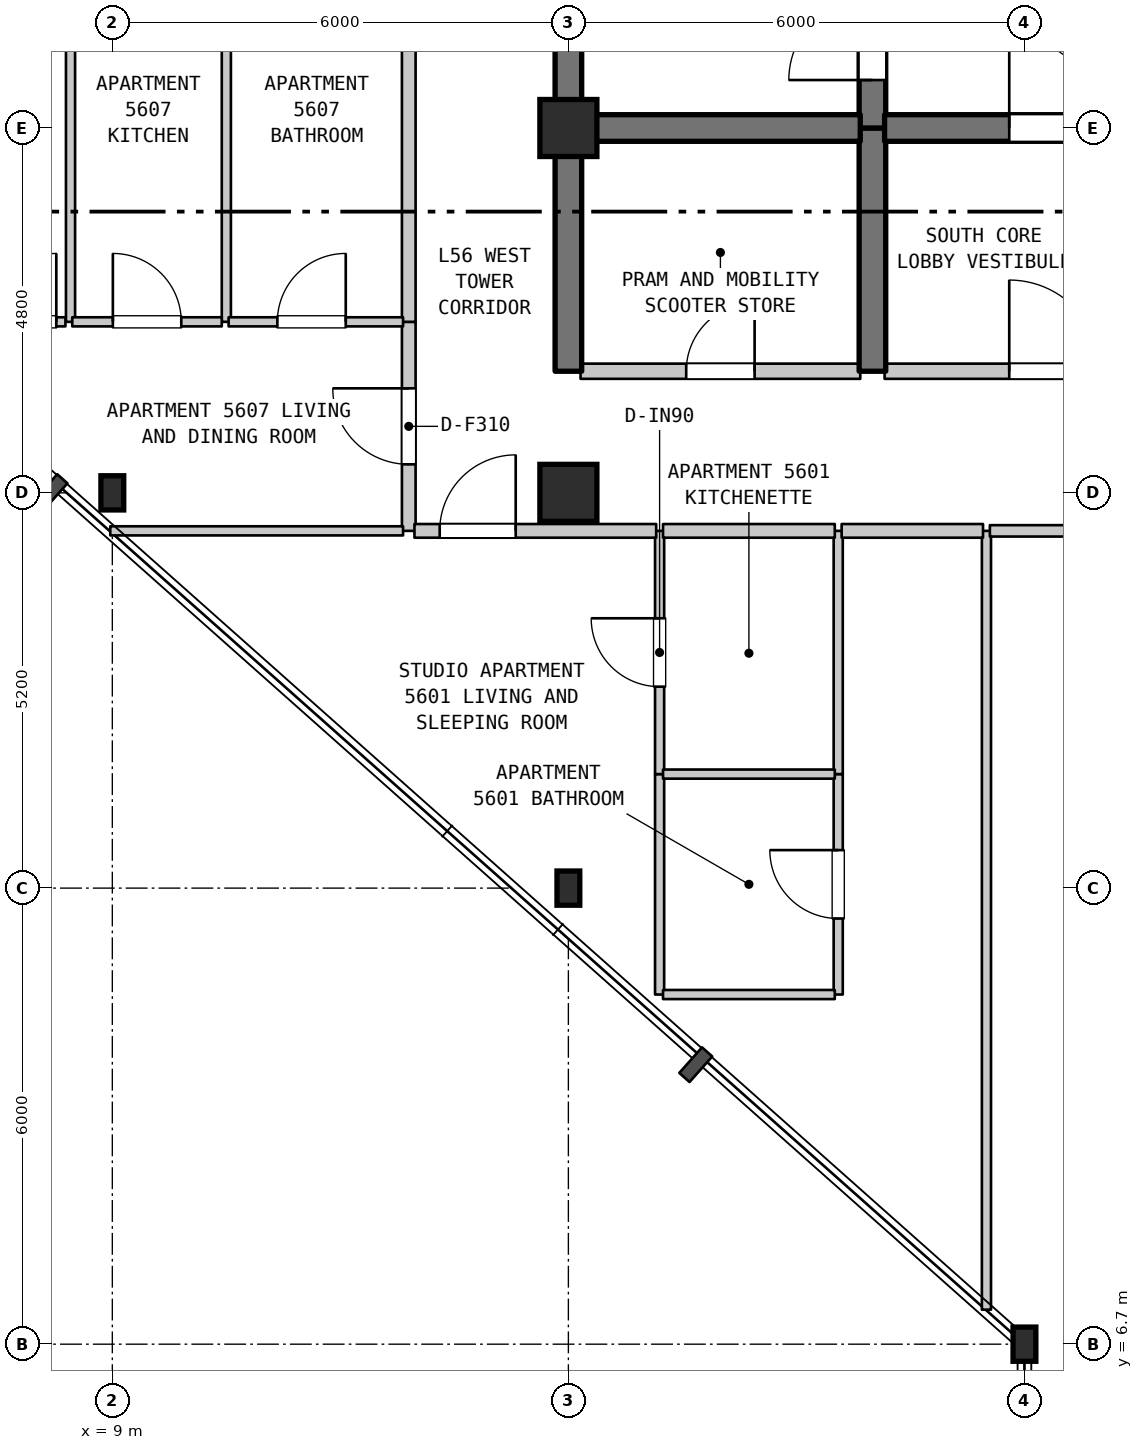
"""IFC4 building model, lengths in metres.
Left out: names, types, materials, properties, quantities, classifications, styles, units other than length and angle.
Written with IfcOpenShell. Run it as: python <this file> out.ifc"""

import sys

from ifc_helpers import new_model, si_unit, direction, frame, frame_2d, origin, origin_2d, place, context, subcontext, project, spatial, rectangle, i_section, extrude, element, fill, save


model = new_model("IFC4")
c1 = context("Model", 3, precision=1e-05, world=origin(), true_north=direction((0.0, 1.0)))
c2 = subcontext(c1, "Body", "Model", "MODEL_VIEW")
j1 = project(units=[si_unit("LENGTHUNIT", "METRE"), si_unit("PLANEANGLEUNIT", "RADIAN")], contexts=[c1])
p1 = place(None, origin())
s1 = spatial("IfcSite", under=j1, at=p1, CompositionType="ELEMENT")
p2 = place(p1, origin())
s2 = spatial("IfcBuilding", under=s1, at=p2, CompositionType="ELEMENT")
p3 = place(p2, frame((0.0, 0.0, 226.5)))
s3 = spatial("IfcBuildingStorey", under=s2, at=p3, CompositionType="ELEMENT", Elevation=226.5)
for number, where, z_axis, x_axis in (
    (1, (9.0, 17.9, 0.0), (0.0, 0.0, 1.0), (1.0, 0.0, 0.0)),
    (2, (15.0, 12.7, 0.0), (0.0, 0.0, 1.0), (1.0, 0.0, 0.0)),
):
    element("IfcColumn", number, at=place(p3, frame(where, z_axis=z_axis, x_axis=x_axis)), inside=s3, PredefinedType="COLUMN", context=c2, shape_type="SweptSolid", body=[
        extrude(i_section(OverallWidth=0.3, OverallDepth=0.45, WebThickness=0.014, FlangeThickness=0.026, FilletRadius=0.027, at=origin_2d()), origin(), (0.0, 0.0, 1.0), 3.7),
    ])
for number, where, z_axis, x_axis in (
    (3, (15.0, 17.9, 0.0), (0.0, 0.0, 1.0), (1.0, 0.0, 0.0)),
    (4, (15.0, 22.7, 0.0), (0.0, 0.0, 1.0), (1.0, 0.0, 0.0)),
):
    element("IfcColumn", number, at=place(p3, frame(where, z_axis=z_axis, x_axis=x_axis)), inside=s3, PredefinedType="COLUMN", context=c2, shape_type="SweptSolid", body=[
        extrude(rectangle(XDim=0.75, YDim=0.75, at=origin_2d()), origin(), (0.0, 0.0, 1.0), 3.7),
    ])
p4 = place(p3, frame((21.0, 6.7, 0.0), z_axis=(0.0, 0.0, 1.0), x_axis=(1.0, 0.0, 0.0)))
e5 = element("IfcColumn", 5, at=p4, inside=s3, PredefinedType="COLUMN", context=c2, shape_type="SweptSolid", body=[
    extrude(i_section(OverallWidth=0.3, OverallDepth=0.45, WebThickness=0.014, FlangeThickness=0.026, FilletRadius=0.027, at=origin_2d()), origin(), (0.0, 0.0, 1.0), 3.7),
])
for number, where, z_axis, x_axis in (
    (6, (8.45, 20.15, 0.0), (0.0, 0.0, 1.0), (0.0, 1.0, 0.0)),
    (7, (10.5, 20.15, 0.0), (0.0, 0.0, 1.0), (0.0, 1.0, 0.0)),
):
    element("IfcWall", number, at=place(p3, frame(where, z_axis=z_axis, x_axis=x_axis)), inside=s3, PredefinedType="PARTITIONING", context=c2, shape_type="SweptSolid", body=[
        extrude(rectangle(XDim=4.97, YDim=0.12, at=frame_2d((2.485, 0.0))), origin(), (0.0, 0.0, 1.0), 3.39),
    ])
p5 = place(p3, frame((12.9, 17.4, 0.0), z_axis=(0.0, 0.0, 1.0), x_axis=(0.0, 1.0, 0.0)))
e8 = element("IfcWall", 8, at=p5, inside=s3, PredefinedType="STANDARD", context=c2, shape_type="SweptSolid", body=[
    extrude(rectangle(XDim=2.75, YDim=0.18, at=frame_2d((1.375, 0.0))), origin(), (0.0, 0.0, 1.0), 3.39),
])
p6 = place(p5, frame((0.875, 0.0, 0.0)))
e9 = element("IfcOpeningElement", 9, at=p6, cuts=e8, PredefinedType="OPENING", context=c2, shape_type="SweptSolid", body=[
    extrude(rectangle(XDim=1.0, YDim=2.15, at=frame_2d((0.5, 1.075))), frame((0.0, 0.1, 0.0), z_axis=(0.0, -1.0, 0.0), x_axis=(1.0, 0.0, 0.0)), (0.0, 0.0, 1.0), 0.2),
])
p7 = place(p3, frame((12.9, 20.15, 0.0), z_axis=(0.0, 0.0, 1.0), x_axis=(0.0, 1.0, 0.0)))
e10 = element("IfcWall", 10, at=p7, inside=s3, PredefinedType="STANDARD", context=c2, shape_type="SweptSolid", body=[
    extrude(rectangle(XDim=4.97, YDim=0.18, at=frame_2d((2.485, 0.0))), origin(), (0.0, 0.0, 1.0), 3.39),
])
p8 = place(p3, frame((15.0, 19.5, 0.0), z_axis=(0.0, 0.0, 1.0), x_axis=(0.0, 1.0, 0.0)))
e11 = element("IfcWall", 11, at=p8, inside=s3, PredefinedType="SHEAR", context=c2, shape_type="SweptSolid", body=[
    extrude(rectangle(XDim=3.2, YDim=0.35, at=frame_2d((1.6, 0.0))), origin(), (0.0, 0.0, 1.0), 3.39),
])
p9 = place(p3, frame((15.0, 22.7, 0.0), z_axis=(0.0, 0.0, 1.0), x_axis=(0.0, 1.0, 0.0)))
e12 = element("IfcWall", 12, at=p9, inside=s3, PredefinedType="SHEAR", context=c2, shape_type="SweptSolid", body=[
    extrude(rectangle(XDim=6.8, YDim=0.35, at=frame_2d((3.4, 0.0))), origin(), (0.0, 0.0, 1.0), 3.39),
])
p10 = place(p3, frame((16.2, 11.3, 0.0), z_axis=(0.0, 0.0, 1.0), x_axis=(0.0, 1.0, 0.0)))
e13 = element("IfcWall", 13, at=p10, inside=s3, PredefinedType="PARTITIONING", context=c2, shape_type="SweptSolid", body=[
    extrude(rectangle(XDim=2.9, YDim=0.12, at=frame_2d((1.45, 0.0))), origin(), (0.0, 0.0, 1.0), 3.39),
])
p11 = place(p3, frame((16.2, 14.2, 0.0), z_axis=(0.0, 0.0, 1.0), x_axis=(0.0, 1.0, 0.0)))
e14 = element("IfcWall", 14, at=p11, inside=s3, PredefinedType="PARTITIONING", context=c2, shape_type="SweptSolid", body=[
    extrude(rectangle(XDim=3.2, YDim=0.12, at=frame_2d((1.6, 0.0))), origin(), (0.0, 0.0, 1.0), 3.39),
])
p12 = place(p11, frame((1.15, 0.0, 0.0)))
e15 = element("IfcOpeningElement", 15, at=p12, cuts=e14, PredefinedType="OPENING", context=c2, shape_type="SweptSolid", body=[
    extrude(rectangle(XDim=0.9, YDim=2.15, at=frame_2d((0.45, 1.075))), frame((0.0, 0.07, 0.0), z_axis=(0.0, -1.0, 0.0), x_axis=(1.0, 0.0, 0.0)), (0.0, 0.0, 1.0), 0.14),
])
p13 = place(p3, frame((18.55, 11.3, 0.0), z_axis=(0.0, 0.0, 1.0), x_axis=(0.0, 1.0, 0.0)))
e16 = element("IfcWall", 16, at=p13, inside=s3, PredefinedType="PARTITIONING", context=c2, shape_type="SweptSolid", body=[
    extrude(rectangle(XDim=2.9, YDim=0.12, at=frame_2d((1.45, 0.0))), origin(), (0.0, 0.0, 1.0), 3.39),
])
p14 = place(p13, frame((1.0, 0.0, 0.0)))
e17 = element("IfcOpeningElement", 17, at=p14, cuts=e16, PredefinedType="OPENING", context=c2, shape_type="SweptSolid", body=[
    extrude(rectangle(XDim=0.9, YDim=2.1, at=frame_2d((0.45, 1.05))), frame((0.0, 0.07, 0.0), z_axis=(0.0, -1.0, 0.0), x_axis=(1.0, 0.0, 0.0)), (0.0, 0.0, 1.0), 0.14),
])
p15 = place(p3, frame((18.55, 14.2, 0.0), z_axis=(0.0, 0.0, 1.0), x_axis=(0.0, 1.0, 0.0)))
e18 = element("IfcWall", 18, at=p15, inside=s3, PredefinedType="PARTITIONING", context=c2, shape_type="SweptSolid", body=[
    extrude(rectangle(XDim=3.2, YDim=0.12, at=frame_2d((1.6, 0.0))), origin(), (0.0, 0.0, 1.0), 3.39),
])
p16 = place(p3, frame((19.0, 19.5, 0.0), z_axis=(0.0, 0.0, 1.0), x_axis=(0.0, 1.0, 0.0)))
e19 = element("IfcWall", 19, at=p16, inside=s3, PredefinedType="SHEAR", context=c2, shape_type="SweptSolid", body=[
    extrude(rectangle(XDim=3.2, YDim=0.35, at=frame_2d((1.6, 0.0))), origin(), (0.0, 0.0, 1.0), 3.39),
])
p17 = place(p3, frame((19.0, 22.7, 0.0), z_axis=(0.0, 0.0, 1.0), x_axis=(0.0, 1.0, 0.0)))
e20 = element("IfcWall", 20, at=p17, inside=s3, PredefinedType="SHEAR", context=c2, shape_type="SweptSolid", body=[
    extrude(rectangle(XDim=5.5, YDim=0.35, at=frame_2d((2.75, 0.0))), origin(), (0.0, 0.0, 1.0), 3.39),
])
p18 = place(p17, frame((0.631, 0.0, 0.0)))
e21 = element("IfcOpeningElement", 21, at=p18, cuts=e20, PredefinedType="OPENING", context=c2, shape_type="SweptSolid", body=[
    extrude(rectangle(XDim=1.1, YDim=2.15, at=frame_2d((0.55, 1.075))), frame((0.0, 0.185, 0.0), z_axis=(0.0, -1.0, 0.0), x_axis=(1.0, 0.0, 0.0)), (0.0, 0.0, 1.0), 0.37),
])
p19 = place(p3, frame((20.5, 7.154, 0.0), z_axis=(0.0, 0.0, 1.0), x_axis=(0.0, 1.0, 0.0)))
e22 = element("IfcWall", 22, at=p19, inside=s3, PredefinedType="PARTITIONING", context=c2, shape_type="SweptSolid", body=[
    extrude(rectangle(XDim=10.246, YDim=0.12, at=frame_2d((5.123, 0.0))), origin(), (0.0, 0.0, 1.0), 3.39),
])
for number, where, z_axis, x_axis in (
    (23, (16.245, 11.3, 0.0), (0.0, 0.0, 1.0), (1.0, 0.0, 0.0)),
    (24, (16.245, 14.2, 0.0), (0.0, 0.0, 1.0), (1.0, 0.0, 0.0)),
):
    element("IfcWall", number, at=place(p3, frame(where, z_axis=z_axis, x_axis=x_axis)), inside=s3, PredefinedType="PARTITIONING", context=c2, shape_type="SweptSolid", body=[
        extrude(rectangle(XDim=2.26, YDim=0.12, at=frame_2d((1.13, 0.0))), origin(), (0.0, 0.0, 1.0), 3.39),
    ])
p20 = place(p3, frame((8.973, 17.4, 0.0), z_axis=(0.0, 0.0, 1.0), x_axis=(1.0, 0.0, 0.0)))
e25 = element("IfcWall", 25, at=p20, inside=s3, PredefinedType="PARTITIONING", context=c2, shape_type="SweptSolid", body=[
    extrude(rectangle(XDim=3.852, YDim=0.12, at=frame_2d((1.926, 0.0))), origin(), (0.0, 0.0, 1.0), 3.39),
])
p21 = place(p3, frame((12.975, 17.4, 0.0), z_axis=(0.0, 0.0, 1.0), x_axis=(1.0, 0.0, 0.0)))
e26 = element("IfcWall", 26, at=p21, inside=s3, PredefinedType="STANDARD", context=c2, shape_type="SweptSolid", body=[
    extrude(rectangle(XDim=3.18, YDim=0.18, at=frame_2d((1.59, 0.0))), origin(), (0.0, 0.0, 1.0), 3.39),
])
p22 = place(p21, frame((0.332, 0.0, 0.0)))
e27 = element("IfcOpeningElement", 27, at=p22, cuts=e26, PredefinedType="OPENING", context=c2, shape_type="SweptSolid", body=[
    extrude(rectangle(XDim=1.0, YDim=2.15, at=frame_2d((0.5, 1.075))), frame((0.0, 0.1, 0.0), z_axis=(0.0, -1.0, 0.0), x_axis=(1.0, 0.0, 0.0)), (0.0, 0.0, 1.0), 0.2),
])
p23 = place(p3, frame((16.245, 17.4, 0.0), z_axis=(0.0, 0.0, 1.0), x_axis=(1.0, 0.0, 0.0)))
e28 = element("IfcWall", 28, at=p23, inside=s3, PredefinedType="STANDARD", context=c2, shape_type="SweptSolid", body=[
    extrude(rectangle(XDim=2.26, YDim=0.18, at=frame_2d((1.13, 0.0))), origin(), (0.0, 0.0, 1.0), 3.39),
])
p24 = place(p3, frame((18.595, 17.4, 0.0), z_axis=(0.0, 0.0, 1.0), x_axis=(1.0, 0.0, 0.0)))
e29 = element("IfcWall", 29, at=p24, inside=s3, PredefinedType="STANDARD", context=c2, shape_type="SweptSolid", body=[
    extrude(rectangle(XDim=1.86, YDim=0.18, at=frame_2d((0.93, 0.0))), origin(), (0.0, 0.0, 1.0), 3.39),
])
p25 = place(p3, frame((20.545, 17.4, 0.0), z_axis=(0.0, 0.0, 1.0), x_axis=(1.0, 0.0, 0.0)))
e30 = element("IfcWall", 30, at=p25, inside=s3, PredefinedType="STANDARD", context=c2, shape_type="SweptSolid", body=[
    extrude(rectangle(XDim=4.91, YDim=0.15, at=frame_2d((2.455, 0.0))), origin(), (0.0, 0.0, 1.0), 3.39),
])
p26 = place(p25, frame((1.884, 0.0, 0.0)))
e31 = element("IfcOpeningElement", 31, at=p26, cuts=e30, PredefinedType="OPENING", context=c2, shape_type="SweptSolid", body=[
    extrude(rectangle(XDim=1.0, YDim=2.15, at=frame_2d((0.5, 1.075))), frame((0.0, 0.085, 0.0), z_axis=(0.0, -1.0, 0.0), x_axis=(1.0, 0.0, 0.0)), (0.0, 0.0, 1.0), 0.17),
])
p27 = place(p3, frame((15.16, 19.5, 0.0), z_axis=(0.0, 0.0, 1.0), x_axis=(1.0, 0.0, 0.0)))
e32 = element("IfcWall", 32, at=p27, inside=s3, PredefinedType="STANDARD", context=c2, shape_type="SweptSolid", body=[
    extrude(rectangle(XDim=3.68, YDim=0.2, at=frame_2d((1.84, 0.0))), origin(), (0.0, 0.0, 1.0), 3.39),
])
p28 = place(p27, frame((1.39, 0.0, 0.0)))
e33 = element("IfcOpeningElement", 33, at=p28, cuts=e32, PredefinedType="OPENING", context=c2, shape_type="SweptSolid", body=[
    extrude(rectangle(XDim=0.9, YDim=2.15, at=frame_2d((0.45, 1.075))), frame((0.0, 0.11, 0.0), z_axis=(0.0, -1.0, 0.0), x_axis=(1.0, 0.0, 0.0)), (0.0, 0.0, 1.0), 0.22),
])
p29 = place(p3, frame((19.16, 19.5, 0.0), z_axis=(0.0, 0.0, 1.0), x_axis=(1.0, 0.0, 0.0)))
e34 = element("IfcWall", 34, at=p29, inside=s3, PredefinedType="STANDARD", context=c2, shape_type="SweptSolid", body=[
    extrude(rectangle(XDim=4.48, YDim=0.2, at=frame_2d((2.24, 0.0))), origin(), (0.0, 0.0, 1.0), 3.39),
])
p30 = place(p29, frame((1.64, 0.0, 0.0)))
e35 = element("IfcOpeningElement", 35, at=p30, cuts=e34, PredefinedType="OPENING", context=c2, shape_type="SweptSolid", body=[
    extrude(rectangle(XDim=1.2, YDim=2.2, at=frame_2d((0.6, 1.1))), frame((0.0, 0.11, 0.0), z_axis=(0.0, -1.0, 0.0), x_axis=(1.0, 0.0, 0.0)), (0.0, 0.0, 1.0), 0.22),
])
p31 = place(p3, frame((5.879, 20.15, 0.0), z_axis=(0.0, 0.0, 1.0), x_axis=(1.0, 0.0, 0.0)))
e36 = element("IfcWall", 36, at=p31, inside=s3, PredefinedType="PARTITIONING", context=c2, shape_type="SweptSolid", body=[
    extrude(rectangle(XDim=2.504, YDim=0.12, at=frame_2d((1.252, 0.0))), origin(), (0.0, 0.0, 1.0), 3.39),
])
p32 = place(p31, frame((1.484, 0.0, 0.0)))
e37 = element("IfcOpeningElement", 37, at=p32, cuts=e36, PredefinedType="OPENING", context=c2, shape_type="SweptSolid", body=[
    extrude(rectangle(XDim=0.9, YDim=2.15, at=frame_2d((0.45, 1.075))), frame((0.0, 0.07, 0.0), z_axis=(0.0, -1.0, 0.0), x_axis=(1.0, 0.0, 0.0)), (0.0, 0.0, 1.0), 0.14),
])
p33 = place(p3, frame((8.473, 20.15, 0.0), z_axis=(0.0, 0.0, 1.0), x_axis=(1.0, 0.0, 0.0)))
e38 = element("IfcWall", 38, at=p33, inside=s3, PredefinedType="PARTITIONING", context=c2, shape_type="SweptSolid", body=[
    extrude(rectangle(XDim=1.967, YDim=0.12, at=frame_2d((0.983, 0.0))), origin(), (0.0, 0.0, 1.0), 3.39),
])
p34 = place(p33, frame((0.534, 0.0, 0.0)))
e39 = element("IfcOpeningElement", 39, at=p34, cuts=e38, PredefinedType="OPENING", context=c2, shape_type="SweptSolid", body=[
    extrude(rectangle(XDim=0.9, YDim=2.15, at=frame_2d((0.45, 1.075))), frame((0.0, 0.07, 0.0), z_axis=(0.0, -1.0, 0.0), x_axis=(1.0, 0.0, 0.0)), (0.0, 0.0, 1.0), 0.14),
])
p35 = place(p3, frame((10.53, 20.15, 0.0), z_axis=(0.0, 0.0, 1.0), x_axis=(1.0, 0.0, 0.0)))
e40 = element("IfcWall", 40, at=p35, inside=s3, PredefinedType="PARTITIONING", context=c2, shape_type="SweptSolid", body=[
    extrude(rectangle(XDim=2.295, YDim=0.12, at=frame_2d((1.147, 0.0))), origin(), (0.0, 0.0, 1.0), 3.39),
])
p36 = place(p35, frame((0.641, 0.0, 0.0)))
e41 = element("IfcOpeningElement", 41, at=p36, cuts=e40, PredefinedType="OPENING", context=c2, shape_type="SweptSolid", body=[
    extrude(rectangle(XDim=0.9, YDim=2.1, at=frame_2d((0.45, 1.05))), frame((0.0, 0.07, 0.0), z_axis=(0.0, -1.0, 0.0), x_axis=(1.0, 0.0, 0.0)), (0.0, 0.0, 1.0), 0.14),
])
p37 = place(p3, frame((15.16, 22.7, 0.0), z_axis=(0.0, 0.0, 1.0), x_axis=(1.0, 0.0, 0.0)))
e42 = element("IfcWall", 42, at=p37, inside=s3, PredefinedType="SHEAR", context=c2, shape_type="SweptSolid", body=[
    extrude(rectangle(XDim=3.68, YDim=0.35, at=frame_2d((1.84, 0.0))), origin(), (0.0, 0.0, 1.0), 3.39),
])
p38 = place(p3, frame((19.16, 22.7, 0.0), z_axis=(0.0, 0.0, 1.0), x_axis=(1.0, 0.0, 0.0)))
e43 = element("IfcWall", 43, at=p38, inside=s3, PredefinedType="SHEAR", context=c2, shape_type="SweptSolid", body=[
    extrude(rectangle(XDim=4.48, YDim=0.35, at=frame_2d((2.24, 0.0))), origin(), (0.0, 0.0, 1.0), 3.39),
])
p39 = place(p38, frame((1.64, 0.0, 0.0)))
e44 = element("IfcOpeningElement", 44, at=p39, cuts=e43, PredefinedType="OPENING", context=c2, shape_type="SweptSolid", body=[
    extrude(rectangle(XDim=1.2, YDim=2.2, at=frame_2d((0.6, 1.1))), frame((0.0, 0.185, 0.0), z_axis=(0.0, -1.0, 0.0), x_axis=(1.0, 0.0, 0.0)), (0.0, 0.0, 1.0), 0.37),
])
p40 = place(p6, origin())
e45 = element("IfcDoor", 45, at=p40, inside=s3, OperationType="SINGLE_SWING_RIGHT", PredefinedType="DOOR", context=c2, shape_type="SweptSolid", body=[
    extrude(rectangle(XDim=1.0, YDim=2.15, at=frame_2d((0.5, 1.075))), frame((0.0, 0.025, 0.0), z_axis=(0.0, -1.0, 0.0), x_axis=(1.0, 0.0, 0.0)), (0.0, 0.0, 1.0), 0.05),
])
fill(e9, e45)
p41 = place(p12, origin())
e46 = element("IfcDoor", 46, at=p41, inside=s3, OperationType="SINGLE_SWING_RIGHT", PredefinedType="DOOR", context=c2, shape_type="SweptSolid", body=[
    extrude(rectangle(XDim=0.9, YDim=2.15, at=frame_2d((0.45, 1.075))), frame((0.0, 0.025, 0.0), z_axis=(0.0, -1.0, 0.0), x_axis=(1.0, 0.0, 0.0)), (0.0, 0.0, 1.0), 0.05),
])
fill(e15, e46)
p42 = place(p14, origin())
e47 = element("IfcDoor", 47, at=p42, inside=s3, OperationType="SINGLE_SWING_RIGHT", PredefinedType="DOOR", context=c2, shape_type="SweptSolid", body=[
    extrude(rectangle(XDim=0.9, YDim=2.1, at=frame_2d((0.45, 1.05))), frame((0.0, 0.025, 0.0), z_axis=(0.0, -1.0, 0.0), x_axis=(1.0, 0.0, 0.0)), (0.0, 0.0, 1.0), 0.05),
])
fill(e17, e47)
p43 = place(p18, origin())
e48 = element("IfcDoor", 48, at=p43, inside=s3, OperationType="SINGLE_SWING_LEFT", PredefinedType="DOOR", context=c2, shape_type="SweptSolid", body=[
    extrude(rectangle(XDim=1.1, YDim=2.15, at=frame_2d((0.55, 1.075))), frame((0.0, 0.025, 0.0), z_axis=(0.0, -1.0, 0.0), x_axis=(1.0, 0.0, 0.0)), (0.0, 0.0, 1.0), 0.05),
])
fill(e21, e48)
p44 = place(p22, origin())
e49 = element("IfcDoor", 49, at=p44, inside=s3, OperationType="SINGLE_SWING_RIGHT", PredefinedType="DOOR", context=c2, shape_type="SweptSolid", body=[
    extrude(rectangle(XDim=1.0, YDim=2.15, at=frame_2d((0.5, 1.075))), frame((0.0, 0.025, 0.0), z_axis=(0.0, -1.0, 0.0), x_axis=(1.0, 0.0, 0.0)), (0.0, 0.0, 1.0), 0.05),
])
fill(e27, e49)
p45 = place(p28, origin())
e50 = element("IfcDoor", 50, at=p45, inside=s3, OperationType="SINGLE_SWING_RIGHT", PredefinedType="DOOR", context=c2, shape_type="SweptSolid", body=[
    extrude(rectangle(XDim=0.9, YDim=2.15, at=frame_2d((0.45, 1.075))), frame((0.0, 0.025, 0.0), z_axis=(0.0, -1.0, 0.0), x_axis=(1.0, 0.0, 0.0)), (0.0, 0.0, 1.0), 0.05),
])
fill(e33, e50)
p46 = place(p30, origin())
e51 = element("IfcDoor", 51, at=p46, inside=s3, OperationType="SINGLE_SWING_LEFT", PredefinedType="DOOR", context=c2, shape_type="SweptSolid", body=[
    extrude(rectangle(XDim=1.2, YDim=2.2, at=frame_2d((0.6, 1.1))), frame((0.0, 0.025, 0.0), z_axis=(0.0, -1.0, 0.0), x_axis=(1.0, 0.0, 0.0)), (0.0, 0.0, 1.0), 0.05),
])
fill(e35, e51)
p47 = place(p32, origin())
e52 = element("IfcDoor", 52, at=p47, inside=s3, OperationType="SINGLE_SWING_RIGHT", PredefinedType="DOOR", context=c2, shape_type="SweptSolid", body=[
    extrude(rectangle(XDim=0.9, YDim=2.15, at=frame_2d((0.45, 1.075))), frame((0.0, 0.025, 0.0), z_axis=(0.0, -1.0, 0.0), x_axis=(1.0, 0.0, 0.0)), (0.0, 0.0, 1.0), 0.05),
])
fill(e37, e52)
p48 = place(p34, origin())
e53 = element("IfcDoor", 53, at=p48, inside=s3, OperationType="SINGLE_SWING_LEFT", PredefinedType="DOOR", context=c2, shape_type="SweptSolid", body=[
    extrude(rectangle(XDim=0.9, YDim=2.15, at=frame_2d((0.45, 1.075))), frame((0.0, 0.025, 0.0), z_axis=(0.0, -1.0, 0.0), x_axis=(1.0, 0.0, 0.0)), (0.0, 0.0, 1.0), 0.05),
])
fill(e39, e53)
p49 = place(p36, origin())
e54 = element("IfcDoor", 54, at=p49, inside=s3, OperationType="SINGLE_SWING_RIGHT", PredefinedType="DOOR", context=c2, shape_type="SweptSolid", body=[
    extrude(rectangle(XDim=0.9, YDim=2.1, at=frame_2d((0.45, 1.05))), frame((0.0, 0.025, 0.0), z_axis=(0.0, -1.0, 0.0), x_axis=(1.0, 0.0, 0.0)), (0.0, 0.0, 1.0), 0.05),
])
fill(e41, e54)
p50 = place(p39, origin())
e55 = element("IfcDoor", 55, at=p50, inside=s3, OperationType="SINGLE_SWING_LEFT", PredefinedType="DOOR", context=c2, shape_type="SweptSolid", body=[
    extrude(rectangle(XDim=1.2, YDim=2.2, at=frame_2d((0.6, 1.1))), frame((0.0, 0.025, 0.0), z_axis=(0.0, -1.0, 0.0), x_axis=(1.0, 0.0, 0.0)), (0.0, 0.0, 1.0), 0.05),
])
fill(e44, e55)
save(model, sys.argv[1])
